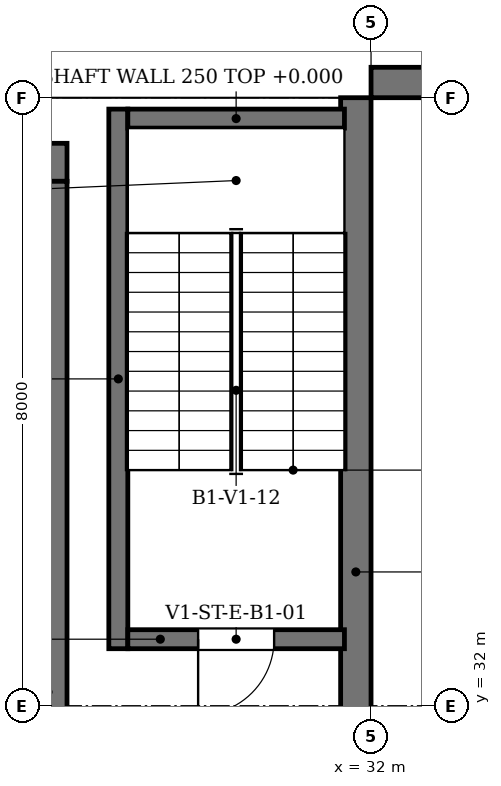
"""IFC4 building model, lengths in metres.
Left out: names, types, materials, properties, quantities, classifications, styles, units other than length and angle.
Written with IfcOpenShell. Run it as: python <this file> out.ifc"""

import sys

from ifc_helpers import new_model, si_unit, direction, frame, frame_2d, origin, place, context, subcontext, project, spatial, rectangle, extrude, element, fill, save


model = new_model("IFC4")
c1 = context("Model", 3, precision=1e-05, world=origin(), true_north=direction((0.0, 1.0)))
c2 = subcontext(c1, "Body", "Model", "MODEL_VIEW")
j1 = project(units=[si_unit("LENGTHUNIT", "METRE"), si_unit("PLANEANGLEUNIT", "RADIAN")], contexts=[c1])
p1 = place(None, origin())
s1 = spatial("IfcSite", under=j1, at=p1, CompositionType="ELEMENT")
p2 = place(p1, origin())
s2 = spatial("IfcBuilding", under=s1, at=p2, CompositionType="ELEMENT")
p3 = place(p2, frame((0.0, 0.0, -4.8)))
s3 = spatial("IfcBuildingStorey", under=s2, at=p3, CompositionType="ELEMENT", Elevation=-4.8)
p4 = place(p3, frame((4.0, 39.15, 0.0), z_axis=(0.0, 0.0, 1.0), x_axis=(1.0, 0.0, 0.0)))
e1 = element("IfcWall", 1, at=p4, inside=s3, PredefinedType="SHEAR", context=c2, shape_type="SweptSolid", body=[
    extrude(rectangle(XDim=24.0, YDim=0.5, at=frame_2d((12.0, 0.0))), origin(), (0.0, 0.0, 1.0), 4.38),
])
p5 = place(p3, frame((27.75, 16.5, 0.0), z_axis=(0.0, 0.0, 1.0), x_axis=(0.0, 1.0, 0.0)))
e2 = element("IfcWall", 2, at=p5, inside=s3, PredefinedType="SHEAR", context=c2, shape_type="SweptSolid", body=[
    extrude(rectangle(XDim=22.4, YDim=0.5, at=frame_2d((11.2, 0.0))), origin(), (0.0, 0.0, 1.0), 4.38),
])
p6 = place(p5, frame((4.575, 0.0, 0.0)))
e3 = element("IfcOpeningElement", 3, at=p6, cuts=e2, PredefinedType="OPENING", context=c2, shape_type="SweptSolid", body=[
    extrude(rectangle(XDim=1.4, YDim=2.4, at=frame_2d((0.7, 1.2))), frame((0.0, 0.26, 0.0), z_axis=(0.0, -1.0, 0.0), x_axis=(1.0, 0.0, 0.0)), (0.0, 0.0, 1.0), 0.52),
])
p7 = place(p5, frame((13.15, 0.0, 0.0)))
e4 = element("IfcOpeningElement", 4, at=p7, cuts=e2, PredefinedType="OPENING", context=c2, shape_type="SweptSolid", body=[
    extrude(rectangle(XDim=0.9, YDim=2.4, at=frame_2d((0.45, 1.2))), frame((0.0, 0.26, 0.0), z_axis=(0.0, -1.0, 0.0), x_axis=(1.0, 0.0, 0.0)), (0.0, 0.0, 1.0), 0.52),
])
p8 = place(p3, frame((32.0, 40.2, 0.0), z_axis=(0.0, 0.0, 1.0), x_axis=(1.0, 0.0, 0.0)))
e5 = element("IfcWall", 5, at=p8, inside=s3, PredefinedType="SOLIDWALL", context=c2, shape_type="SweptSolid", body=[
    extrude(rectangle(XDim=4.0, YDim=0.4, at=frame_2d((2.0, 0.0))), origin(), (0.0, 0.0, 1.0), 4.38),
])
p9 = place(p3, frame((31.8, -1.6, 0.0), z_axis=(0.0, 0.0, 1.0), x_axis=(0.0, 1.0, 0.0)))
e6 = element("IfcWall", 6, at=p9, inside=s3, PredefinedType="SOLIDWALL", context=c2, shape_type="SweptSolid", body=[
    extrude(rectangle(XDim=41.6, YDim=0.4, at=frame_2d((20.8, 0.0))), origin(), (0.0, 0.0, 1.0), 4.38),
])
p10 = place(p3, frame((28.675, 32.75, 0.0), z_axis=(0.0, 0.0, 1.0), x_axis=(0.0, 1.0, 0.0)))
e7 = element("IfcWall", 7, at=p10, inside=s3, PredefinedType="SOLIDWALL", context=c2, shape_type="SweptSolid", body=[
    extrude(rectangle(XDim=7.1, YDim=0.25, at=frame_2d((3.55, 0.0))), origin(), (0.0, 0.0, 1.0), 4.8),
])
p11 = place(p3, frame((28.8, 32.875, 0.0), z_axis=(0.0, 0.0, 1.0), x_axis=(1.0, 0.0, 0.0)))
e8 = element("IfcWall", 8, at=p11, inside=s3, PredefinedType="SOLIDWALL", context=c2, shape_type="SweptSolid", body=[
    extrude(rectangle(XDim=2.85, YDim=0.25, at=frame_2d((1.425, 0.0))), origin(), (0.0, 0.0, 1.0), 4.8),
])
p12 = place(p11, frame((0.925, 0.0, 0.0)))
e9 = element("IfcOpeningElement", 9, at=p12, cuts=e8, PredefinedType="OPENING", context=c2, shape_type="SweptSolid", body=[
    extrude(rectangle(XDim=1.0, YDim=2.1, at=frame_2d((0.5, 1.05))), frame((0.0, 0.135, 0.0), z_axis=(0.0, -1.0, 0.0), x_axis=(1.0, 0.0, 0.0)), (0.0, 0.0, 1.0), 0.27),
])
p13 = place(p3, frame((28.8, 39.725, 0.0), z_axis=(0.0, 0.0, 1.0), x_axis=(1.0, 0.0, 0.0)))
e10 = element("IfcWall", 10, at=p13, inside=s3, PredefinedType="SOLIDWALL", context=c2, shape_type="SweptSolid", body=[
    extrude(rectangle(XDim=2.85, YDim=0.25, at=frame_2d((1.425, 0.0))), origin(), (0.0, 0.0, 1.0), 4.8),
])
p14 = place(p12, frame((1.0, 0.0, 0.0), z_axis=(0.0, 0.0, 1.0), x_axis=(-1.0, 0.0, 0.0)))
e11 = element("IfcDoor", 11, at=p14, inside=s3, OperationType="SINGLE_SWING_LEFT", PredefinedType="DOOR", context=c2, shape_type="SweptSolid", body=[
    extrude(rectangle(XDim=1.0, YDim=2.1, at=frame_2d((0.5, 1.05))), frame((0.0, 0.025, 0.0), z_axis=(0.0, -1.0, 0.0), x_axis=(1.0, 0.0, 0.0)), (0.0, 0.0, 1.0), 0.05),
])
fill(e9, e11)
save(model, sys.argv[1])
